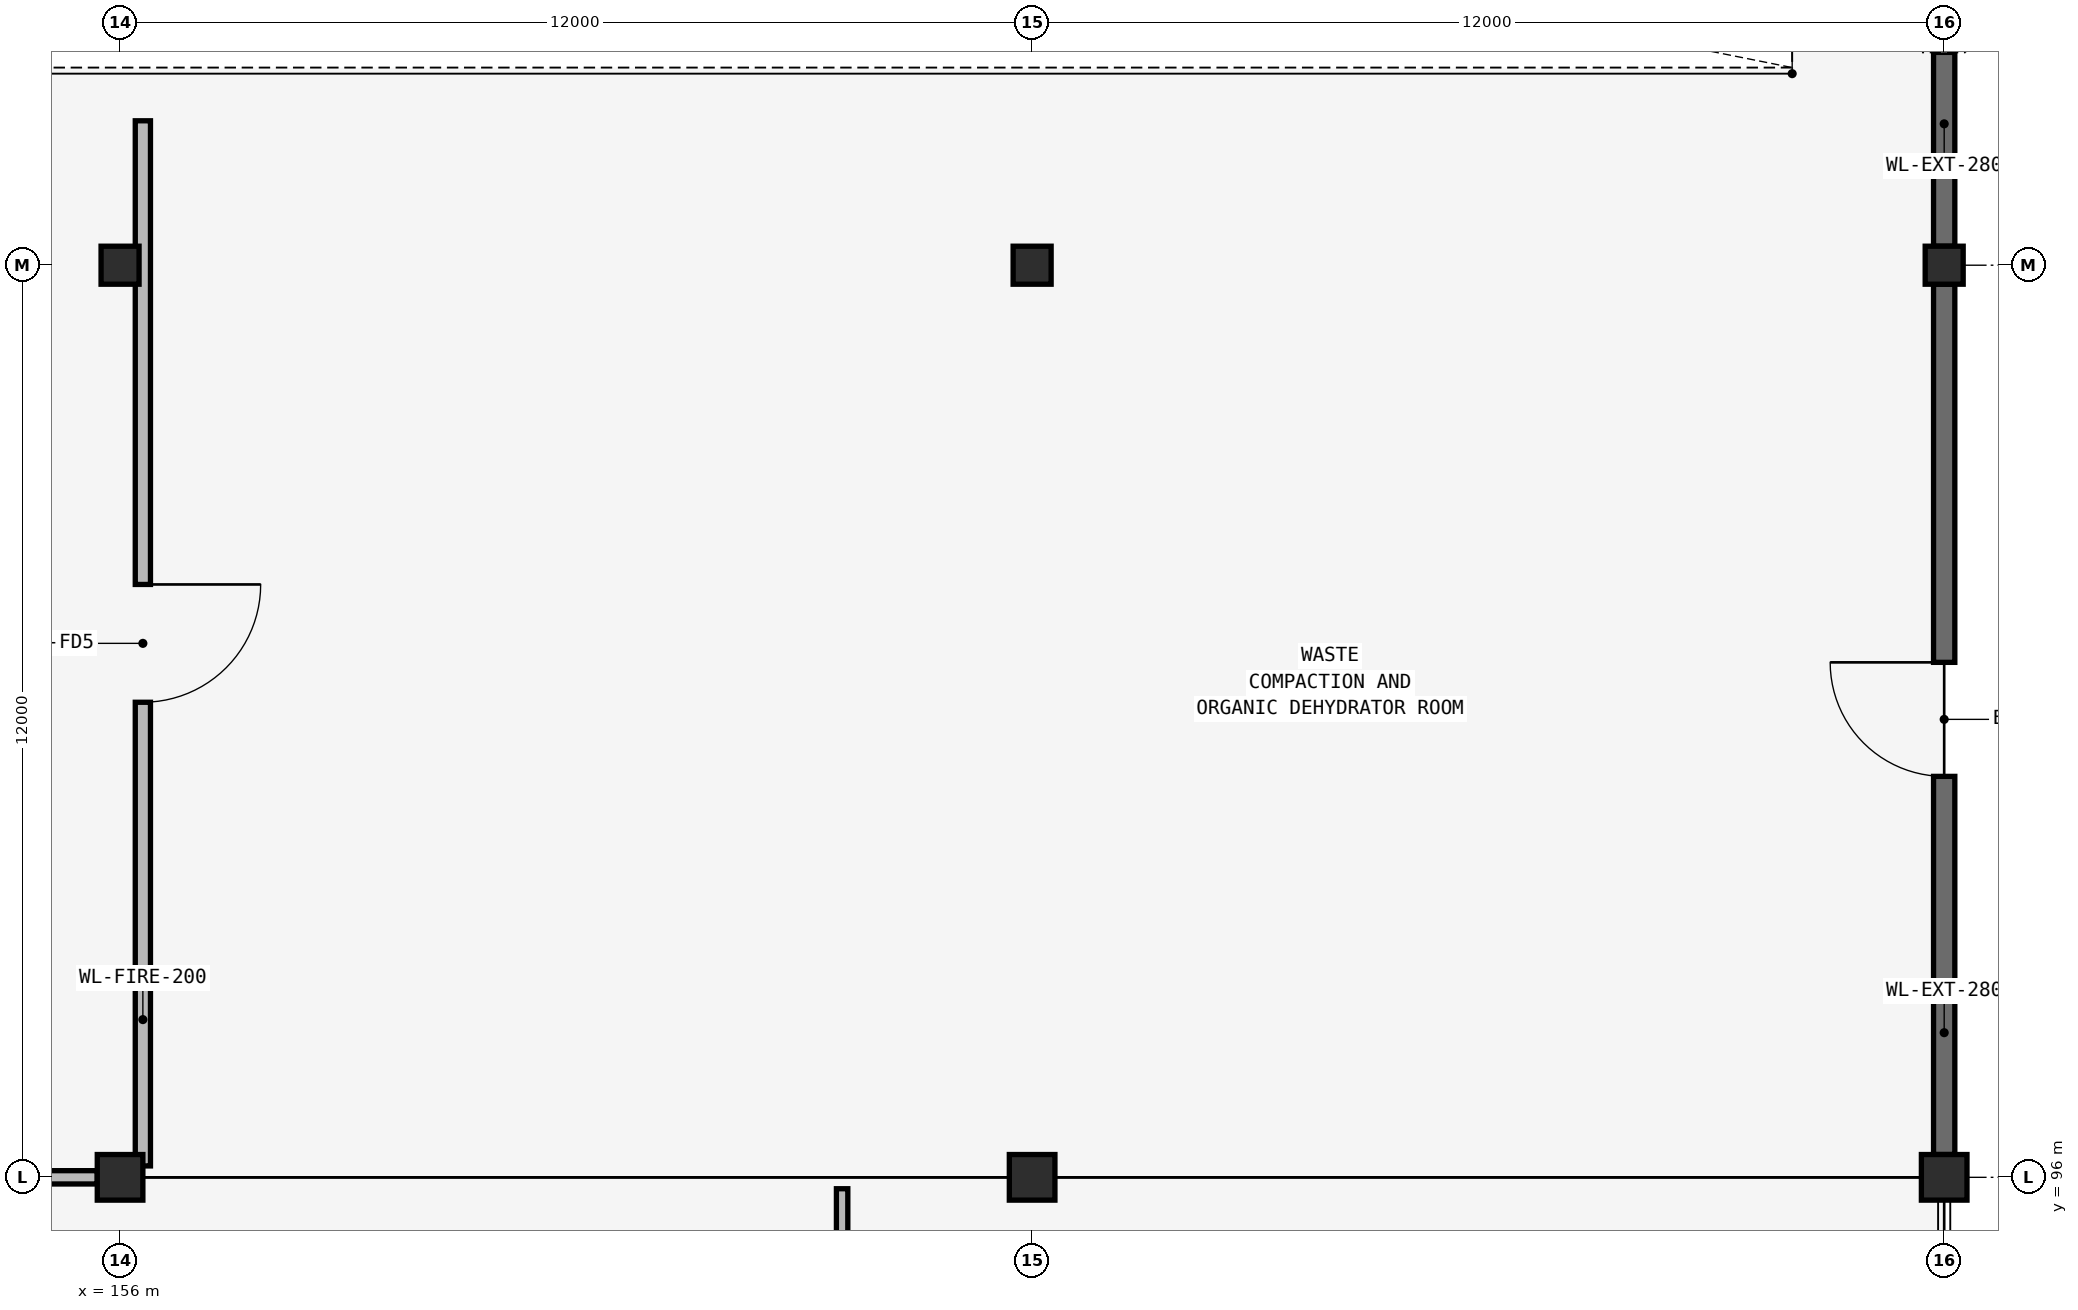
"""IFC4 building model, lengths in metres.
Left out: names, types, materials, properties, quantities, classifications, styles, units other than length and angle.
Written with IfcOpenShell. Run it as: python <this file> out.ifc"""

import sys

from ifc_helpers import new_model, si_unit, direction, frame, frame_2d, origin, origin_2d, place, context, subcontext, project, spatial, rectangle, extrude, element, fill, save


model = new_model("IFC4")
c1 = context("Model", 3, precision=1e-05, world=origin(), true_north=direction((0.0, 1.0)))
c2 = subcontext(c1, "Body", "Model", "MODEL_VIEW")
j1 = project(units=[si_unit("LENGTHUNIT", "METRE"), si_unit("PLANEANGLEUNIT", "RADIAN")], contexts=[c1])
p1 = place(None, origin())
s1 = spatial("IfcSite", under=j1, at=p1, CompositionType="ELEMENT")
p2 = place(p1, origin())
s2 = spatial("IfcBuilding", under=s1, at=p2, CompositionType="ELEMENT")
p3 = place(p2, origin())
s3 = spatial("IfcBuildingStorey", under=s2, at=p3, CompositionType="ELEMENT", Elevation=0.0)
for number, where, z_axis, x_axis in (
    (1, (156.0, 96.0, 0.0), (0.0, 0.0, 1.0), (1.0, 0.0, 0.0)),
    (2, (168.0, 96.0, 0.0), (0.0, 0.0, 1.0), (1.0, 0.0, 0.0)),
    (3, (180.0, 96.0, 0.0), (0.0, 0.0, 1.0), (1.0, 0.0, 0.0)),
):
    element("IfcColumn", number, at=place(p3, frame(where, z_axis=z_axis, x_axis=x_axis)), inside=s3, PredefinedType="COLUMN", context=c2, shape_type="SweptSolid", body=[
        extrude(rectangle(XDim=0.6, YDim=0.6, at=origin_2d()), origin(), (0.0, 0.0, 1.0), 5.4),
    ])
for number, where, z_axis, x_axis in (
    (4, (156.0, 108.0, 0.0), (0.0, 0.0, 1.0), (1.0, 0.0, 0.0)),
    (5, (168.0, 108.0, 0.0), (0.0, 0.0, 1.0), (1.0, 0.0, 0.0)),
    (6, (180.0, 108.0, 0.0), (0.0, 0.0, 1.0), (1.0, 0.0, 0.0)),
):
    element("IfcColumn", number, at=place(p3, frame(where, z_axis=z_axis, x_axis=x_axis)), inside=s3, PredefinedType="COLUMN", context=c2, shape_type="SweptSolid", body=[
        extrude(rectangle(XDim=0.5, YDim=0.5, at=origin_2d()), origin(), (0.0, 0.0, 1.0), 5.4),
    ])
p4 = place(p3, frame((144.3, 96.0, 0.0), z_axis=(0.0, 0.0, 1.0), x_axis=(1.0, 0.0, 0.0)))
e7 = element("IfcWall", 7, at=p4, inside=s3, PredefinedType="SOLIDWALL", context=c2, shape_type="SweptSolid", body=[
    extrude(rectangle(XDim=11.4, YDim=0.175, at=frame_2d((5.7, 0.0))), origin(), (0.0, 0.0, 1.0), 4.256),
])
p5 = place(p4, frame((5.15, 0.0, 0.0)))
e8 = element("IfcOpeningElement", 8, at=p5, cuts=e7, PredefinedType="OPENING", context=c2, shape_type="SweptSolid", body=[
    extrude(rectangle(XDim=1.1, YDim=2.15, at=frame_2d((0.55, 1.075))), frame((0.0, 0.103, 0.0), z_axis=(0.0, -1.0, 0.0), x_axis=(1.0, 0.0, 0.0)), (0.0, 0.0, 1.0), 0.205),
])
p6 = place(p3, frame((180.0, 96.3, 0.0), z_axis=(0.0, 0.0, 1.0), x_axis=(0.0, 1.0, 0.0)))
e9 = element("IfcWall", 9, at=p6, inside=s3, PredefinedType="SOLIDWALL", context=c2, shape_type="SweptSolid", body=[
    extrude(rectangle(XDim=11.45, YDim=0.28, at=frame_2d((5.725, 0.0))), origin(), (0.0, 0.0, 1.0), 5.08),
])
p7 = place(p6, frame((4.975, 0.0, 0.0)))
e10 = element("IfcOpeningElement", 10, at=p7, cuts=e9, PredefinedType="OPENING", context=c2, shape_type="SweptSolid", body=[
    extrude(rectangle(XDim=1.5, YDim=2.2, at=frame_2d((0.75, 1.1))), frame((0.0, 0.155, 0.0), z_axis=(0.0, -1.0, 0.0), x_axis=(1.0, 0.0, 0.0)), (0.0, 0.0, 1.0), 0.31),
])
p8 = place(p3, frame((180.0, 108.25, 0.0), z_axis=(0.0, 0.0, 1.0), x_axis=(0.0, 1.0, 0.0)))
e11 = element("IfcWall", 11, at=p8, inside=s3, PredefinedType="SOLIDWALL", context=c2, shape_type="SweptSolid", body=[
    extrude(rectangle(XDim=11.5, YDim=0.28, at=frame_2d((5.75, 0.0))), origin(), (0.0, 0.0, 1.0), 5.08),
])
p9 = place(p8, frame((2.55, 0.0, 0.0)))
e12 = element("IfcOpeningElement", 12, at=p9, cuts=e11, PredefinedType="OPENING", context=c2, shape_type="SweptSolid", body=[
    extrude(rectangle(XDim=6.2, YDim=3.2, at=frame_2d((3.1, 1.6))), frame((0.0, 0.155, 0.0), z_axis=(0.0, -1.0, 0.0), x_axis=(1.0, 0.0, 0.0)), (0.0, 0.0, 1.0), 0.31),
])
p10 = place(p3, frame((165.5, 77.05, 0.0), z_axis=(0.0, 0.0, 1.0), x_axis=(0.0, 1.0, 0.0)))
e13 = element("IfcWall", 13, at=p10, inside=s3, PredefinedType="PARTITIONING", context=c2, shape_type="SweptSolid", body=[
    extrude(rectangle(XDim=18.8, YDim=0.15, at=frame_2d((9.4, 0.0))), origin(), (0.0, 0.0, 1.0), 5.08),
])
p11 = place(p10, frame((8.475, 0.0, 0.0)))
e14 = element("IfcOpeningElement", 14, at=p11, cuts=e13, PredefinedType="OPENING", context=c2, shape_type="SweptSolid", body=[
    extrude(rectangle(XDim=1.85, YDim=2.2, at=frame_2d((0.925, 1.1))), frame((0.0, 0.09, 0.0), z_axis=(0.0, -1.0, 0.0), x_axis=(1.0, 0.0, 0.0)), (0.0, 0.0, 1.0), 0.18),
])
p12 = place(p3, frame((156.3, 96.15, 0.0), z_axis=(0.0, 0.0, 1.0), x_axis=(0.0, 1.0, 0.0)))
e15 = element("IfcWall", 15, at=p12, inside=s3, PredefinedType="SOLIDWALL", context=c2, shape_type="SweptSolid", body=[
    extrude(rectangle(XDim=13.75, YDim=0.2, at=frame_2d((6.875, 0.0))), origin(), (0.0, 0.0, 1.0), 5.08),
])
p13 = place(p12, frame((6.1, 0.0, 0.0)))
e16 = element("IfcOpeningElement", 16, at=p13, cuts=e15, PredefinedType="OPENING", context=c2, shape_type="SweptSolid", body=[
    extrude(rectangle(XDim=1.55, YDim=2.25, at=frame_2d((0.775, 1.125))), frame((0.0, 0.115, 0.0), z_axis=(0.0, -1.0, 0.0), x_axis=(1.0, 0.0, 0.0)), (0.0, 0.0, 1.0), 0.23),
])
p14 = place(p7, frame((1.5, 0.0, 0.0), z_axis=(0.0, 0.0, 1.0), x_axis=(-1.0, 0.0, 0.0)))
e17 = element("IfcDoor", 17, at=p14, inside=s3, OperationType="SINGLE_SWING_RIGHT", PredefinedType="DOOR", context=c2, shape_type="SweptSolid", body=[
    extrude(rectangle(XDim=1.5, YDim=2.2, at=frame_2d((0.75, 1.1))), frame((0.0, 0.025, 0.0), z_axis=(0.0, -1.0, 0.0), x_axis=(1.0, 0.0, 0.0)), (0.0, 0.0, 1.0), 0.05),
])
fill(e10, e17)
p15 = place(p9, frame((6.2, 0.0, 0.0), z_axis=(0.0, 0.0, 1.0), x_axis=(-1.0, 0.0, 0.0)))
e18 = element("IfcDoor", 18, at=p15, inside=s3, OperationType="ROLLINGUP", PredefinedType="GATE", context=c2, shape_type="SweptSolid", body=[
    extrude(rectangle(XDim=6.2, YDim=3.2, at=frame_2d((3.1, 1.6))), frame((0.0, 0.025, 0.0), z_axis=(0.0, -1.0, 0.0), x_axis=(1.0, 0.0, 0.0)), (0.0, 0.0, 1.0), 0.05),
])
fill(e12, e18)
p16 = place(p13, origin())
e19 = element("IfcDoor", 19, at=p16, inside=s3, OperationType="SINGLE_SWING_RIGHT", PredefinedType="DOOR", context=c2, shape_type="SweptSolid", body=[
    extrude(rectangle(XDim=1.55, YDim=2.25, at=frame_2d((0.775, 1.125))), frame((0.0, 0.025, 0.0), z_axis=(0.0, -1.0, 0.0), x_axis=(1.0, 0.0, 0.0)), (0.0, 0.0, 1.0), 0.05),
])
fill(e16, e19)
save(model, sys.argv[1])
